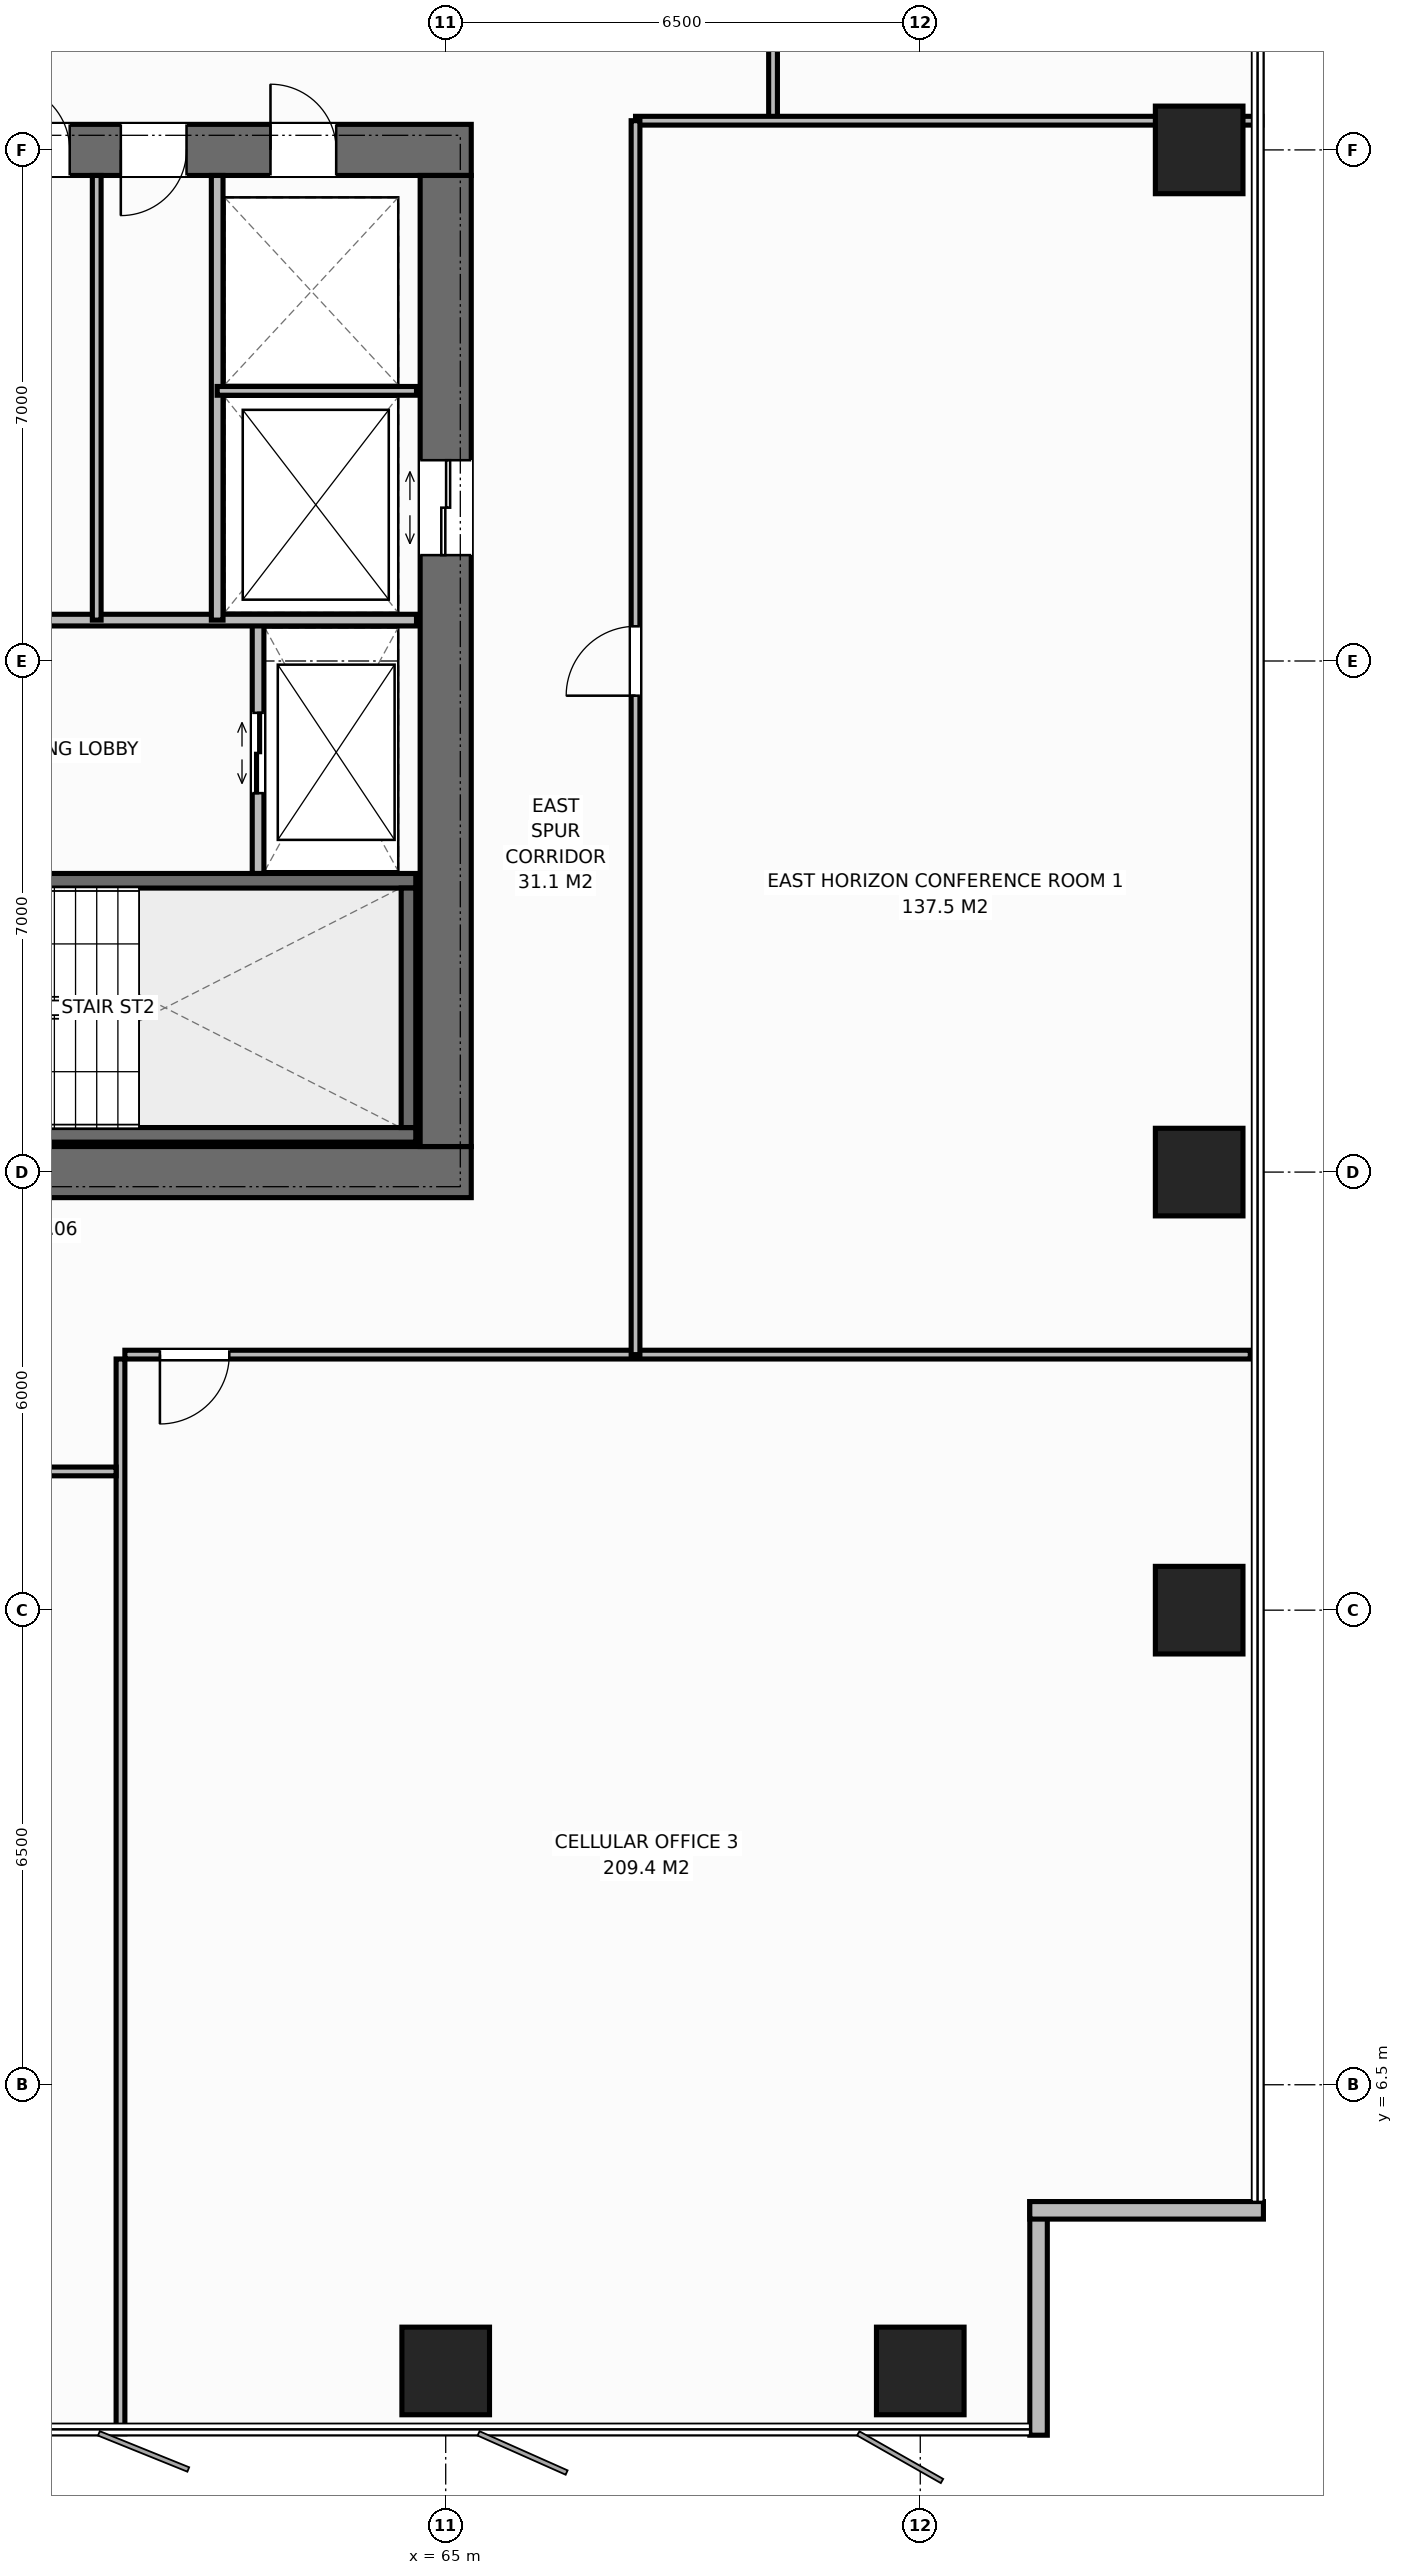
"""IFC4 building model, lengths in metres.
Left out: names, types, materials, properties, quantities, classifications, styles, units other than length and angle.
Written with IfcOpenShell. Run it as: python <this file> out.ifc"""

import sys

from ifc_helpers import new_model, si_unit, direction, frame, frame_2d, origin, origin_2d, place, context, subcontext, project, spatial, rectangle, extrude, element, fill, save


model = new_model("IFC4")
c1 = context("Model", 3, precision=1e-05, world=origin(), true_north=direction((0.0, 1.0)))
c2 = subcontext(c1, "Body", "Model", "MODEL_VIEW")
j1 = project(units=[si_unit("LENGTHUNIT", "METRE"), si_unit("PLANEANGLEUNIT", "RADIAN")], contexts=[c1])
p1 = place(None, origin())
s1 = spatial("IfcSite", under=j1, at=p1, CompositionType="ELEMENT")
p2 = place(p1, origin())
s2 = spatial("IfcBuilding", under=s1, at=p2, CompositionType="ELEMENT")
p3 = place(p2, frame((0.0, 0.0, 105.0)))
s3 = spatial("IfcBuildingStorey", under=s2, at=p3, CompositionType="ELEMENT", Elevation=105.0)
p4 = place(p3, frame((51.65, 19.0, 0.0), z_axis=(0.0, 0.0, 1.0), x_axis=(1.0, 0.0, 0.0)))
e1 = element("IfcWall", 1, at=p4, inside=s3, PredefinedType="SHEAR", context=c2, shape_type="SweptSolid", body=[
    extrude(rectangle(XDim=13.7, YDim=0.7, at=frame_2d((6.85, 0.0))), origin(), (0.0, 0.0, 1.0), 3.8),
])
p5 = place(p4, frame((3.07, 0.0, 0.0)))
e2 = element("IfcOpeningElement", 2, at=p5, cuts=e1, PredefinedType="OPENING", context=c2, shape_type="SweptSolid", body=[
    extrude(rectangle(XDim=1.4, YDim=2.2, at=frame_2d((0.7, 1.1))), frame((0.0, 0.36, 0.0), z_axis=(0.0, -1.0, 0.0), x_axis=(1.0, 0.0, 0.0)), (0.0, 0.0, 1.0), 0.72),
])
p6 = place(p3, frame((51.65, 33.0, 0.0), z_axis=(0.0, 0.0, 1.0), x_axis=(1.0, 0.0, 0.0)))
e3 = element("IfcWall", 3, at=p6, inside=s3, PredefinedType="SHEAR", context=c2, shape_type="SweptSolid", body=[
    extrude(rectangle(XDim=13.7, YDim=0.7, at=frame_2d((6.85, 0.0))), origin(), (0.0, 0.0, 1.0), 3.8),
])
p7 = place(p6, frame((3.07, 0.0, 0.0)))
e4 = element("IfcOpeningElement", 4, at=p7, cuts=e3, PredefinedType="OPENING", context=c2, shape_type="SweptSolid", body=[
    extrude(rectangle(XDim=1.4, YDim=2.2, at=frame_2d((0.7, 1.1))), frame((0.0, 0.36, 0.0), z_axis=(0.0, -1.0, 0.0), x_axis=(1.0, 0.0, 0.0)), (0.0, 0.0, 1.0), 0.72),
])
p8 = place(p6, frame((10.95, 0.0, 0.0)))
e5 = element("IfcOpeningElement", 5, at=p8, cuts=e3, PredefinedType="OPENING", context=c2, shape_type="SweptSolid", body=[
    extrude(rectangle(XDim=0.9, YDim=2.15, at=frame_2d((0.45, 1.075))), frame((0.0, 0.36, 0.0), z_axis=(0.0, -1.0, 0.0), x_axis=(1.0, 0.0, 0.0)), (0.0, 0.0, 1.0), 0.72),
])
p9 = place(p6, frame((5.7, 0.0, 0.0)))
e6 = element("IfcOpeningElement", 6, at=p9, cuts=e3, PredefinedType="OPENING", context=c2, shape_type="SweptSolid", body=[
    extrude(rectangle(XDim=0.9, YDim=2.15, at=frame_2d((0.45, 1.075))), frame((0.0, 0.36, 0.0), z_axis=(0.0, -1.0, 0.0), x_axis=(1.0, 0.0, 0.0)), (0.0, 0.0, 1.0), 0.72),
])
p10 = place(p6, frame((7.3, 0.0, 0.0)))
e7 = element("IfcOpeningElement", 7, at=p10, cuts=e3, PredefinedType="OPENING", context=c2, shape_type="SweptSolid", body=[
    extrude(rectangle(XDim=0.9, YDim=2.15, at=frame_2d((0.45, 1.075))), frame((0.0, 0.36, 0.0), z_axis=(0.0, -1.0, 0.0), x_axis=(1.0, 0.0, 0.0)), (0.0, 0.0, 1.0), 0.72),
])
p11 = place(p6, frame((8.9, 0.0, 0.0)))
e8 = element("IfcOpeningElement", 8, at=p11, cuts=e3, PredefinedType="OPENING", context=c2, shape_type="SweptSolid", body=[
    extrude(rectangle(XDim=0.9, YDim=2.15, at=frame_2d((0.45, 1.075))), frame((0.0, 0.36, 0.0), z_axis=(0.0, -1.0, 0.0), x_axis=(1.0, 0.0, 0.0)), (0.0, 0.0, 1.0), 0.72),
])
p12 = place(p3, frame((65.0, 19.35, 0.0), z_axis=(0.0, 0.0, 1.0), x_axis=(0.0, 1.0, 0.0)))
e9 = element("IfcWall", 9, at=p12, inside=s3, PredefinedType="SHEAR", context=c2, shape_type="SweptSolid", body=[
    extrude(rectangle(XDim=13.3, YDim=0.7, at=frame_2d((6.65, 0.0))), origin(), (0.0, 0.0, 1.0), 3.8),
])
p13 = place(p12, frame((8.1, 0.0, 0.0)))
e10 = element("IfcOpeningElement", 10, at=p13, cuts=e9, PredefinedType="OPENING", context=c2, shape_type="SweptSolid", body=[
    extrude(rectangle(XDim=1.3, YDim=2.2, at=frame_2d((0.65, 1.1))), frame((0.0, 0.36, 0.0), z_axis=(0.0, -1.0, 0.0), x_axis=(1.0, 0.0, 0.0)), (0.0, 0.0, 1.0), 0.72),
])
p14 = place(p3, frame((56.16, 19.51, 0.0), z_axis=(0.0, 0.0, 1.0), x_axis=(1.0, 0.0, 0.0)))
e11 = element("IfcWall", 11, at=p14, inside=s3, PredefinedType="SHEAR", context=c2, shape_type="SweptSolid", body=[
    extrude(rectangle(XDim=8.43, YDim=0.2, at=frame_2d((4.215, 0.0))), origin(), (0.0, 0.0, 1.0), 3.8),
])
p15 = place(p3, frame((56.16, 22.99, 0.0), z_axis=(0.0, 0.0, 1.0), x_axis=(1.0, 0.0, 0.0)))
e12 = element("IfcWall", 12, at=p15, inside=s3, PredefinedType="SHEAR", context=c2, shape_type="SweptSolid", body=[
    extrude(rectangle(XDim=8.43, YDim=0.2, at=frame_2d((4.215, 0.0))), origin(), (0.0, 0.0, 1.0), 3.8),
])
p16 = place(p15, frame((0.45, 0.0, 0.0)))
e13 = element("IfcOpeningElement", 13, at=p16, cuts=e12, PredefinedType="OPENING", context=c2, shape_type="SweptSolid", body=[
    extrude(rectangle(XDim=1.0, YDim=2.15, at=frame_2d((0.5, 1.075))), frame((0.0, 0.11, 0.0), z_axis=(0.0, -1.0, 0.0), x_axis=(1.0, 0.0, 0.0)), (0.0, 0.0, 1.0), 0.22),
])
p17 = place(p3, frame((64.49, 19.61, 0.0), z_axis=(0.0, 0.0, 1.0), x_axis=(0.0, 1.0, 0.0)))
e14 = element("IfcWall", 14, at=p17, inside=s3, PredefinedType="SHEAR", context=c2, shape_type="SweptSolid", body=[
    extrude(rectangle(XDim=3.28, YDim=0.2, at=frame_2d((1.64, 0.0))), origin(), (0.0, 0.0, 1.0), 3.8),
])
for number, where, z_axis, x_axis in (
    (15, (65.0, 2.58, 0.0), (0.0, 0.0, 1.0), (1.0, 0.0, 0.0)),
    (16, (71.5, 2.58, 0.0), (0.0, 0.0, 1.0), (1.0, 0.0, 0.0)),
    (17, (75.32, 13.0, 0.0), (0.0, 0.0, 1.0), (1.0, 0.0, 0.0)),
    (18, (75.32, 19.0, 0.0), (0.0, 0.0, 1.0), (1.0, 0.0, 0.0)),
    (19, (75.32, 33.0, 0.0), (0.0, 0.0, 1.0), (1.0, 0.0, 0.0)),
):
    element("IfcColumn", number, at=place(p3, frame(where, z_axis=z_axis, x_axis=x_axis)), inside=s3, PredefinedType="COLUMN", context=c2, shape_type="SweptSolid", body=[
        extrude(rectangle(XDim=1.2, YDim=1.2, at=origin_2d()), origin(), (0.0, 0.0, 1.0), 3.8),
    ])
for number, where, z_axis, x_axis in (
    (20, (73.12, 4.9, 0.0), (0.0, 0.0, 1.0), (0.0, -1.0, 0.0)),
    (21, (76.2, 4.78, 0.0), (0.0, 0.0, 1.0), (-1.0, 0.0, 0.0)),
):
    element("IfcWall", number, at=place(p3, frame(where, z_axis=z_axis, x_axis=x_axis)), inside=s3, PredefinedType="STANDARD", context=c2, shape_type="SweptSolid", body=[
        extrude(rectangle(XDim=3.2, YDim=0.24, at=frame_2d((1.6, 0.0))), origin(), (0.0, 0.0, 1.0), 3.565),
    ])
p18 = place(p3, frame((62.43, 23.09, 0.0), z_axis=(0.0, 0.0, 1.0), x_axis=(0.0, 1.0, 0.0)))
e22 = element("IfcWall", 22, at=p18, inside=s3, PredefinedType="STANDARD", context=c2, shape_type="SweptSolid", body=[
    extrude(rectangle(XDim=3.47, YDim=0.16, at=frame_2d((1.735, 0.0))), origin(), (0.0, 0.0, 1.0), 3.565),
])
p19 = place(p18, frame((1.1, 0.0, 0.0)))
e23 = element("IfcOpeningElement", 23, at=p19, cuts=e22, PredefinedType="OPENING", context=c2, shape_type="SweptSolid", body=[
    extrude(rectangle(XDim=1.1, YDim=2.2, at=frame_2d((0.55, 1.1))), frame((0.0, 0.09, 0.0), z_axis=(0.0, -1.0, 0.0), x_axis=(1.0, 0.0, 0.0)), (0.0, 0.0, 1.0), 0.18),
])
p20 = place(p3, frame((56.26, 26.56, 0.0), z_axis=(0.0, 0.0, 1.0), x_axis=(1.0, 0.0, 0.0)))
e24 = element("IfcWall", 24, at=p20, inside=s3, PredefinedType="STANDARD", context=c2, shape_type="SweptSolid", body=[
    extrude(rectangle(XDim=8.34, YDim=0.16, at=frame_2d((4.17, 0.0))), origin(), (0.0, 0.0, 1.0), 3.565),
])
p21 = place(p3, frame((61.87, 26.56, 0.0), z_axis=(0.0, 0.0, 1.0), x_axis=(0.0, 1.0, 0.0)))
e25 = element("IfcWall", 25, at=p21, inside=s3, PredefinedType="STANDARD", context=c2, shape_type="SweptSolid", body=[
    extrude(rectangle(XDim=6.09, YDim=0.16, at=frame_2d((3.045, 0.0))), origin(), (0.0, 0.0, 1.0), 3.565),
])
p22 = place(p3, frame((61.87, 29.7, 0.0), z_axis=(0.0, 0.0, 1.0), x_axis=(1.0, 0.0, 0.0)))
e26 = element("IfcWall", 26, at=p22, inside=s3, PredefinedType="PARTITIONING", context=c2, shape_type="SweptSolid", body=[
    extrude(rectangle(XDim=2.73, YDim=0.12, at=frame_2d((1.365, 0.0))), origin(), (0.0, 0.0, 1.0), 3.565),
])
p23 = place(p3, frame((60.22, 26.56, 0.0), z_axis=(0.0, 0.0, 1.0), x_axis=(0.0, 1.0, 0.0)))
e27 = element("IfcWall", 27, at=p23, inside=s3, PredefinedType="PARTITIONING", context=c2, shape_type="SweptSolid", body=[
    extrude(rectangle(XDim=6.09, YDim=0.12, at=frame_2d((3.045, 0.0))), origin(), (0.0, 0.0, 1.0), 3.565),
])
p24 = place(p3, frame((69.483, 33.4, 0.0), z_axis=(0.0, 0.0, 1.0), x_axis=(0.0, 1.0, 0.0)))
e28 = element("IfcWall", 28, at=p24, inside=s3, PredefinedType="PARTITIONING", context=c2, shape_type="SweptSolid", body=[
    extrude(rectangle(XDim=2.1, YDim=0.12, at=frame_2d((1.05, 0.0))), origin(), (0.0, 0.0, 1.0), 3.565),
])
p25 = place(p3, frame((60.546, 1.72, 0.0), z_axis=(0.0, 0.0, 1.0), x_axis=(0.0, 1.0, 0.0)))
e29 = element("IfcWall", 29, at=p25, inside=s3, PredefinedType="PARTITIONING", context=c2, shape_type="SweptSolid", body=[
    extrude(rectangle(XDim=14.72, YDim=0.12, at=frame_2d((7.36, 0.0))), origin(), (0.0, 0.0, 1.0), 3.565),
])
p26 = place(p3, frame((44.332, 14.9, 0.0), z_axis=(0.0, 0.0, 1.0), x_axis=(1.0, 0.0, 0.0)))
e30 = element("IfcWall", 30, at=p26, inside=s3, PredefinedType="PARTITIONING", context=c2, shape_type="SweptSolid", body=[
    extrude(rectangle(XDim=16.154, YDim=0.12, at=frame_2d((8.077, 0.0))), origin(), (0.0, 0.0, 1.0), 3.565),
])
p27 = place(p26, frame((4.846, 0.0, 0.0)))
e31 = element("IfcOpeningElement", 31, at=p27, cuts=e30, PredefinedType="OPENING", context=c2, shape_type="SweptSolid", body=[
    extrude(rectangle(XDim=0.95, YDim=2.15, at=frame_2d((0.475, 1.075))), frame((0.0, 0.07, 0.0), z_axis=(0.0, -1.0, 0.0), x_axis=(1.0, 0.0, 0.0)), (0.0, 0.0, 1.0), 0.14),
])
p28 = place(p3, frame((60.606, 16.5, 0.0), z_axis=(0.0, 0.0, 1.0), x_axis=(1.0, 0.0, 0.0)))
e32 = element("IfcWall", 32, at=p28, inside=s3, PredefinedType="PARTITIONING", context=c2, shape_type="SweptSolid", body=[
    extrude(rectangle(XDim=15.414, YDim=0.12, at=frame_2d((7.707, 0.0))), origin(), (0.0, 0.0, 1.0), 3.565),
])
p29 = place(p28, frame((0.48, 0.0, 0.0)))
e33 = element("IfcOpeningElement", 33, at=p29, cuts=e32, PredefinedType="OPENING", context=c2, shape_type="SweptSolid", body=[
    extrude(rectangle(XDim=0.95, YDim=2.15, at=frame_2d((0.475, 1.075))), frame((0.0, 0.07, 0.0), z_axis=(0.0, -1.0, 0.0), x_axis=(1.0, 0.0, 0.0)), (0.0, 0.0, 1.0), 0.14),
])
p30 = place(p3, frame((67.6, 33.4, 0.0), z_axis=(0.0, 0.0, 1.0), x_axis=(1.0, 0.0, 0.0)))
e34 = element("IfcWall", 34, at=p30, inside=s3, PredefinedType="PARTITIONING", context=c2, shape_type="SweptSolid", body=[
    extrude(rectangle(XDim=8.58, YDim=0.12, at=frame_2d((4.29, 0.0))), origin(), (0.0, 0.0, 1.0), 3.565),
])
p31 = place(p3, frame((67.6, 16.5, 0.0), z_axis=(0.0, 0.0, 1.0), x_axis=(0.0, 1.0, 0.0)))
e35 = element("IfcWall", 35, at=p31, inside=s3, PredefinedType="PARTITIONING", context=c2, shape_type="SweptSolid", body=[
    extrude(rectangle(XDim=16.9, YDim=0.12, at=frame_2d((8.45, 0.0))), origin(), (0.0, 0.0, 1.0), 3.565),
])
p32 = place(p31, frame((9.025, 0.0, 0.0)))
e36 = element("IfcOpeningElement", 36, at=p32, cuts=e35, PredefinedType="OPENING", context=c2, shape_type="SweptSolid", body=[
    extrude(rectangle(XDim=0.95, YDim=2.15, at=frame_2d((0.475, 1.075))), frame((0.0, 0.07, 0.0), z_axis=(0.0, -1.0, 0.0), x_axis=(1.0, 0.0, 0.0)), (0.0, 0.0, 1.0), 0.14),
])
p33 = place(p19, origin())
e37 = element("IfcDoor", 37, at=p33, inside=s3, OperationType="DOUBLE_DOOR_SLIDING", PredefinedType="DOOR", context=c2, shape_type="SweptSolid", body=[
    extrude(rectangle(XDim=1.1, YDim=2.2, at=frame_2d((0.55, 1.1))), frame((0.0, 0.025, 0.0), z_axis=(0.0, -1.0, 0.0), x_axis=(1.0, 0.0, 0.0)), (0.0, 0.0, 1.0), 0.05),
])
fill(e23, e37)
p34 = place(p13, origin())
e38 = element("IfcDoor", 38, at=p34, inside=s3, OperationType="DOUBLE_DOOR_SLIDING", PredefinedType="DOOR", context=c2, shape_type="SweptSolid", body=[
    extrude(rectangle(XDim=1.3, YDim=2.2, at=frame_2d((0.65, 1.1))), frame((0.0, 0.025, 0.0), z_axis=(0.0, -1.0, 0.0), x_axis=(1.0, 0.0, 0.0)), (0.0, 0.0, 1.0), 0.05),
])
fill(e10, e38)
p35 = place(p8, origin())
e39 = element("IfcDoor", 39, at=p35, inside=s3, OperationType="SINGLE_SWING_LEFT", PredefinedType="DOOR", context=c2, shape_type="SweptSolid", body=[
    extrude(rectangle(XDim=0.9, YDim=2.15, at=frame_2d((0.45, 1.075))), frame((0.0, -0.075, 0.0), z_axis=(0.0, -1.0, 0.0), x_axis=(1.0, 0.0, 0.0)), (0.0, 0.0, 1.0), 0.05),
])
fill(e5, e39)
p36 = place(p10, origin())
e40 = element("IfcDoor", 40, at=p36, inside=s3, OperationType="SINGLE_SWING_LEFT", PredefinedType="DOOR", context=c2, shape_type="SweptSolid", body=[
    extrude(rectangle(XDim=0.9, YDim=2.15, at=frame_2d((0.45, 1.075))), frame((0.0, -0.075, 0.0), z_axis=(0.0, -1.0, 0.0), x_axis=(1.0, 0.0, 0.0)), (0.0, 0.0, 1.0), 0.05),
])
fill(e7, e40)
p37 = place(p11, origin())
e41 = element("IfcDoor", 41, at=p37, inside=s3, OperationType="SINGLE_SWING_RIGHT", PredefinedType="DOOR", context=c2, shape_type="SweptSolid", body=[
    extrude(rectangle(XDim=0.9, YDim=2.15, at=frame_2d((0.45, 1.075))), frame((0.0, -0.075, 0.0), z_axis=(0.0, -1.0, 0.0), x_axis=(1.0, 0.0, 0.0)), (0.0, 0.0, 1.0), 0.05),
])
fill(e8, e41)
p38 = place(p29, origin())
e42 = element("IfcDoor", 42, at=p38, inside=s3, OperationType="SINGLE_SWING_RIGHT", PredefinedType="DOOR", context=c2, shape_type="SweptSolid", body=[
    extrude(rectangle(XDim=0.95, YDim=2.15, at=frame_2d((0.475, 1.075))), frame((0.0, 0.025, 0.0), z_axis=(0.0, -1.0, 0.0), x_axis=(1.0, 0.0, 0.0)), (0.0, 0.0, 1.0), 0.05),
])
fill(e33, e42)
p39 = place(p32, origin())
e43 = element("IfcDoor", 43, at=p39, inside=s3, OperationType="SINGLE_SWING_LEFT", PredefinedType="DOOR", context=c2, shape_type="SweptSolid", body=[
    extrude(rectangle(XDim=0.95, YDim=2.15, at=frame_2d((0.475, 1.075))), frame((0.0, 0.025, 0.0), z_axis=(0.0, -1.0, 0.0), x_axis=(1.0, 0.0, 0.0)), (0.0, 0.0, 1.0), 0.05),
])
fill(e36, e43)
save(model, sys.argv[1])
